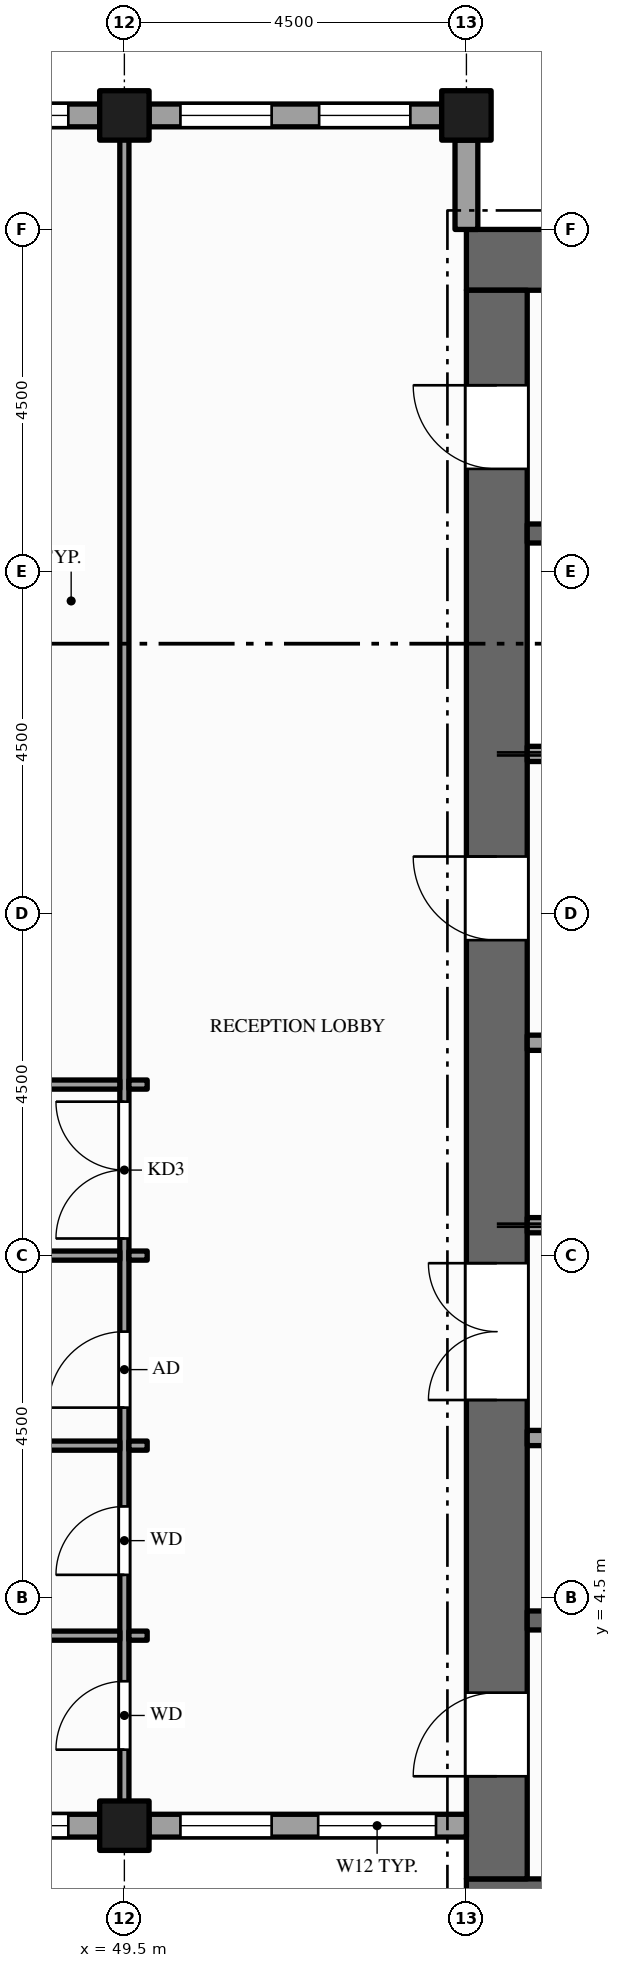
"""IFC4 building model, lengths in metres.
Left out: names, types, materials, properties, quantities, classifications, styles, units other than length and angle.
Written with IfcOpenShell. Run it as: python <this file> out.ifc"""

import sys

from ifc_helpers import new_model, si_unit, direction, frame, frame_2d, origin, origin_2d, place, context, subcontext, project, spatial, rectangle, hollow_rectangle, extrude, element, fill, save


model = new_model("IFC4")
c1 = context("Model", 3, precision=1e-05, world=origin(), true_north=direction((0.0, 1.0)))
c2 = subcontext(c1, "Body", "Model", "MODEL_VIEW")
j1 = project(units=[si_unit("LENGTHUNIT", "METRE"), si_unit("PLANEANGLEUNIT", "RADIAN")], contexts=[c1])
p1 = place(None, origin())
s1 = spatial("IfcSite", under=j1, at=p1, CompositionType="ELEMENT")
p2 = place(p1, origin())
s2 = spatial("IfcBuilding", under=s1, at=p2, CompositionType="ELEMENT")
p3 = place(p2, frame((0.0, 0.0, 249.0)))
s3 = spatial("IfcBuildingStorey", under=s2, at=p3, CompositionType="ELEMENT", Elevation=249.0)
for number, where, z_axis, x_axis in (
    (1, (67.5, 0.4, -0.15), (0.0, 0.0, 1.0), (-1.0, 0.0, 0.0)),
    (2, (54.0, 22.1, -0.15), (0.0, 0.0, 1.0), (1.0, 0.0, 0.0)),
):
    element("IfcWall", number, at=place(p3, frame(where, z_axis=z_axis, x_axis=x_axis)), inside=s3, PredefinedType="SHEAR", context=c2, shape_type="SweptSolid", body=[
        extrude(rectangle(XDim=13.5, YDim=0.8, at=frame_2d((6.75, 0.0))), origin(), (0.0, 0.0, 1.0), 4.0),
    ])
p4 = place(p3, frame((54.4, 0.8, -0.15), z_axis=(0.0, 0.0, 1.0), x_axis=(0.0, 1.0, 0.0)))
e3 = element("IfcWall", 3, at=p4, inside=s3, PredefinedType="SHEAR", context=c2, shape_type="SweptSolid", body=[
    extrude(rectangle(XDim=20.9, YDim=0.8, at=frame_2d((10.45, 0.0))), origin(), (0.0, 0.0, 1.0), 4.0),
])
p5 = place(p4, frame((6.3, 0.0, 0.15)))
e4 = element("IfcOpeningElement", 4, at=p5, cuts=e3, PredefinedType="OPENING", context=c2, shape_type="SweptSolid", body=[
    extrude(rectangle(XDim=1.8, YDim=2.1, at=frame_2d((0.9, 1.05))), frame((0.0, 0.41, 0.0), z_axis=(0.0, -1.0, 0.0), x_axis=(1.0, 0.0, 0.0)), (0.0, 0.0, 1.0), 0.82),
])
p6 = place(p4, frame((12.35, 0.0, 0.15)))
e5 = element("IfcOpeningElement", 5, at=p6, cuts=e3, PredefinedType="OPENING", context=c2, shape_type="SweptSolid", body=[
    extrude(rectangle(XDim=1.1, YDim=2.1, at=frame_2d((0.55, 1.05))), frame((0.0, 0.41, 0.0), z_axis=(0.0, -1.0, 0.0), x_axis=(1.0, 0.0, 0.0)), (0.0, 0.0, 1.0), 0.82),
])
p7 = place(p4, frame((1.35, 0.0, 0.15)))
e6 = element("IfcOpeningElement", 6, at=p7, cuts=e3, PredefinedType="OPENING", context=c2, shape_type="SweptSolid", body=[
    extrude(rectangle(XDim=1.1, YDim=2.1, at=frame_2d((0.55, 1.05))), frame((0.0, 0.41, 0.0), z_axis=(0.0, -1.0, 0.0), x_axis=(1.0, 0.0, 0.0)), (0.0, 0.0, 1.0), 0.82),
])
p8 = place(p4, frame((18.55, 0.0, 0.15)))
e7 = element("IfcOpeningElement", 7, at=p8, cuts=e3, PredefinedType="OPENING", context=c2, shape_type="SweptSolid", body=[
    extrude(rectangle(XDim=1.1, YDim=2.1, at=frame_2d((0.55, 1.05))), frame((0.0, 0.41, 0.0), z_axis=(0.0, -1.0, 0.0), x_axis=(1.0, 0.0, 0.0)), (0.0, 0.0, 1.0), 0.82),
])
for number, where, z_axis, x_axis in (
    (8, (49.5, 1.5, -0.15), (0.0, 0.0, 1.0), (1.0, 0.0, 0.0)),
    (9, (49.5, 24.0, -0.15), (0.0, 0.0, 1.0), (1.0, 0.0, 0.0)),
    (10, (54.0, 24.0, -0.15), (0.0, 0.0, 1.0), (1.0, 0.0, 0.0)),
):
    element("IfcColumn", number, at=place(p3, frame(where, z_axis=z_axis, x_axis=x_axis)), inside=s3, PredefinedType="COLUMN", context=c2, shape_type="SweptSolid", body=[
        extrude(hollow_rectangle(XDim=0.65, YDim=0.65, WallThickness=0.032, at=origin_2d()), origin(), (0.0, 0.0, 1.0), 4.0),
    ])
p9 = place(p3, frame((45.325, 1.5, 0.0), z_axis=(0.0, 0.0, 1.0), x_axis=(1.0, 0.0, 0.0)))
e11 = element("IfcWall", 11, at=p9, inside=s3, PredefinedType="STANDARD", context=c2, shape_type="SweptSolid", body=[
    extrude(rectangle(XDim=3.85, YDim=0.3, at=frame_2d((1.925, 0.0))), origin(), (0.0, 0.0, 1.0), 2.87),
])
p10 = place(p9, frame((0.413, 0.0, 0.9)))
e12 = element("IfcOpeningElement", 12, at=p10, cuts=e11, PredefinedType="OPENING", context=c2, shape_type="SweptSolid", body=[
    extrude(rectangle(XDim=1.2, YDim=1.75, at=frame_2d((0.6, 0.875))), frame((0.0, 0.16, 0.0), z_axis=(0.0, -1.0, 0.0), x_axis=(1.0, 0.0, 0.0)), (0.0, 0.0, 1.0), 0.32),
])
p11 = place(p9, frame((2.238, 0.0, 0.9)))
e13 = element("IfcOpeningElement", 13, at=p11, cuts=e11, PredefinedType="OPENING", context=c2, shape_type="SweptSolid", body=[
    extrude(rectangle(XDim=1.2, YDim=1.75, at=frame_2d((0.6, 0.875))), frame((0.0, 0.16, 0.0), z_axis=(0.0, -1.0, 0.0), x_axis=(1.0, 0.0, 0.0)), (0.0, 0.0, 1.0), 0.32),
])
p12 = place(p3, frame((49.825, 1.5, 0.0), z_axis=(0.0, 0.0, 1.0), x_axis=(1.0, 0.0, 0.0)))
e14 = element("IfcWall", 14, at=p12, inside=s3, PredefinedType="STANDARD", context=c2, shape_type="SweptSolid", body=[
    extrude(rectangle(XDim=4.175, YDim=0.3, at=frame_2d((2.087, 0.0))), origin(), (0.0, 0.0, 1.0), 2.87),
])
p13 = place(p12, frame((0.413, 0.0, 0.9)))
e15 = element("IfcOpeningElement", 15, at=p13, cuts=e14, PredefinedType="OPENING", context=c2, shape_type="SweptSolid", body=[
    extrude(rectangle(XDim=1.2, YDim=1.75, at=frame_2d((0.6, 0.875))), frame((0.0, 0.16, 0.0), z_axis=(0.0, -1.0, 0.0), x_axis=(1.0, 0.0, 0.0)), (0.0, 0.0, 1.0), 0.32),
])
p14 = place(p12, frame((2.225, 0.0, 0.9)))
e16 = element("IfcOpeningElement", 16, at=p14, cuts=e14, PredefinedType="OPENING", context=c2, shape_type="SweptSolid", body=[
    extrude(rectangle(XDim=1.55, YDim=1.75, at=frame_2d((0.775, 0.875))), frame((0.0, 0.16, 0.0), z_axis=(0.0, -1.0, 0.0), x_axis=(1.0, 0.0, 0.0)), (0.0, 0.0, 1.0), 0.32),
])
p15 = place(p3, frame((54.0, 22.5, 0.0), z_axis=(0.0, 0.0, 1.0), x_axis=(0.0, 1.0, 0.0)))
e17 = element("IfcWall", 17, at=p15, inside=s3, PredefinedType="STANDARD", context=c2, shape_type="SweptSolid", body=[
    extrude(rectangle(XDim=1.175, YDim=0.3, at=frame_2d((0.587, 0.0))), origin(), (0.0, 0.0, 1.0), 3.162),
])
p16 = place(p3, frame((53.675, 24.0, 0.0), z_axis=(0.0, 0.0, 1.0), x_axis=(-1.0, 0.0, 0.0)))
e18 = element("IfcWall", 18, at=p16, inside=s3, PredefinedType="STANDARD", context=c2, shape_type="SweptSolid", body=[
    extrude(rectangle(XDim=3.85, YDim=0.3, at=frame_2d((1.925, 0.0))), origin(), (0.0, 0.0, 1.0), 2.87),
])
p17 = place(p16, frame((0.413, 0.0, 0.9)))
e19 = element("IfcOpeningElement", 19, at=p17, cuts=e18, PredefinedType="OPENING", context=c2, shape_type="SweptSolid", body=[
    extrude(rectangle(XDim=1.2, YDim=1.75, at=frame_2d((0.6, 0.875))), frame((0.0, 0.16, 0.0), z_axis=(0.0, -1.0, 0.0), x_axis=(1.0, 0.0, 0.0)), (0.0, 0.0, 1.0), 0.32),
])
p18 = place(p16, frame((2.238, 0.0, 0.9)))
e20 = element("IfcOpeningElement", 20, at=p18, cuts=e18, PredefinedType="OPENING", context=c2, shape_type="SweptSolid", body=[
    extrude(rectangle(XDim=1.2, YDim=1.75, at=frame_2d((0.6, 0.875))), frame((0.0, 0.16, 0.0), z_axis=(0.0, -1.0, 0.0), x_axis=(1.0, 0.0, 0.0)), (0.0, 0.0, 1.0), 0.32),
])
p19 = place(p3, frame((49.175, 24.0, 0.0), z_axis=(0.0, 0.0, 1.0), x_axis=(-1.0, 0.0, 0.0)))
e21 = element("IfcWall", 21, at=p19, inside=s3, PredefinedType="STANDARD", context=c2, shape_type="SweptSolid", body=[
    extrude(rectangle(XDim=3.85, YDim=0.3, at=frame_2d((1.925, 0.0))), origin(), (0.0, 0.0, 1.0), 2.87),
])
p20 = place(p19, frame((0.413, 0.0, 0.9)))
e22 = element("IfcOpeningElement", 22, at=p20, cuts=e21, PredefinedType="OPENING", context=c2, shape_type="SweptSolid", body=[
    extrude(rectangle(XDim=1.2, YDim=1.75, at=frame_2d((0.6, 0.875))), frame((0.0, 0.16, 0.0), z_axis=(0.0, -1.0, 0.0), x_axis=(1.0, 0.0, 0.0)), (0.0, 0.0, 1.0), 0.32),
])
p21 = place(p19, frame((2.238, 0.0, 0.9)))
e23 = element("IfcOpeningElement", 23, at=p21, cuts=e21, PredefinedType="OPENING", context=c2, shape_type="SweptSolid", body=[
    extrude(rectangle(XDim=1.2, YDim=1.75, at=frame_2d((0.6, 0.875))), frame((0.0, 0.16, 0.0), z_axis=(0.0, -1.0, 0.0), x_axis=(1.0, 0.0, 0.0)), (0.0, 0.0, 1.0), 0.32),
])
p22 = place(p3, frame((49.5, 1.65, 0.0), z_axis=(0.0, 0.0, 1.0), x_axis=(0.0, 1.0, 0.0)))
e24 = element("IfcWall", 24, at=p22, inside=s3, PredefinedType="PARTITIONING", context=c2, shape_type="SweptSolid", body=[
    extrude(rectangle(XDim=22.2, YDim=0.12, at=frame_2d((11.1, 0.0))), origin(), (0.0, 0.0, 1.0), 2.87),
])
p23 = place(p22, frame((7.575, 0.0, 0.0)))
e25 = element("IfcOpeningElement", 25, at=p23, cuts=e24, PredefinedType="OPENING", context=c2, shape_type="SweptSolid", body=[
    extrude(rectangle(XDim=1.8, YDim=2.1, at=frame_2d((0.9, 1.05))), frame((0.0, 0.07, 0.0), z_axis=(0.0, -1.0, 0.0), x_axis=(1.0, 0.0, 0.0)), (0.0, 0.0, 1.0), 0.14),
])
p24 = place(p22, frame((0.85, 0.0, 0.0)))
e26 = element("IfcOpeningElement", 26, at=p24, cuts=e24, PredefinedType="OPENING", context=c2, shape_type="SweptSolid", body=[
    extrude(rectangle(XDim=0.9, YDim=2.1, at=frame_2d((0.45, 1.05))), frame((0.0, 0.07, 0.0), z_axis=(0.0, -1.0, 0.0), x_axis=(1.0, 0.0, 0.0)), (0.0, 0.0, 1.0), 0.14),
])
p25 = place(p22, frame((3.15, 0.0, 0.0)))
e27 = element("IfcOpeningElement", 27, at=p25, cuts=e24, PredefinedType="OPENING", context=c2, shape_type="SweptSolid", body=[
    extrude(rectangle(XDim=0.9, YDim=2.1, at=frame_2d((0.45, 1.05))), frame((0.0, 0.07, 0.0), z_axis=(0.0, -1.0, 0.0), x_axis=(1.0, 0.0, 0.0)), (0.0, 0.0, 1.0), 0.14),
])
p26 = place(p22, frame((5.35, 0.0, 0.0)))
e28 = element("IfcOpeningElement", 28, at=p26, cuts=e24, PredefinedType="OPENING", context=c2, shape_type="SweptSolid", body=[
    extrude(rectangle(XDim=1.0, YDim=2.1, at=frame_2d((0.5, 1.05))), frame((0.0, 0.07, 0.0), z_axis=(0.0, -1.0, 0.0), x_axis=(1.0, 0.0, 0.0)), (0.0, 0.0, 1.0), 0.14),
])
p27 = place(p3, frame((45.06, 4.0, 0.0), z_axis=(0.0, 0.0, 1.0), x_axis=(1.0, 0.0, 0.0)))
e29 = element("IfcWall", 29, at=p27, inside=s3, PredefinedType="PARTITIONING", context=c2, shape_type="SweptSolid", body=[
    extrude(rectangle(XDim=4.38, YDim=0.12, at=frame_2d((2.19, 0.0))), origin(), (0.0, 0.0, 1.0), 2.87),
])
p28 = place(p3, frame((49.56, 4.0, 0.0), z_axis=(0.0, 0.0, 1.0), x_axis=(1.0, 0.0, 0.0)))
e30 = element("IfcWall", 30, at=p28, inside=s3, PredefinedType="PARTITIONING", context=c2, shape_type="SweptSolid", body=[
    extrude(rectangle(XDim=0.24, YDim=0.12, at=frame_2d((0.12, 0.0))), origin(), (0.0, 0.0, 1.0), 2.87),
])
p29 = place(p3, frame((54.8, 4.2, 0.0), z_axis=(0.0, 0.0, 1.0), x_axis=(1.0, 0.0, 0.0)))
e31 = element("IfcWall", 31, at=p29, inside=s3, PredefinedType="SHEAR", context=c2, shape_type="SweptSolid", body=[
    extrude(rectangle(XDim=6.475, YDim=0.25, at=frame_2d((3.237, 0.0))), origin(), (0.0, 0.0, 1.0), 3.85),
])
p30 = place(p3, frame((45.06, 6.5, 0.0), z_axis=(0.0, 0.0, 1.0), x_axis=(1.0, 0.0, 0.0)))
e32 = element("IfcWall", 32, at=p30, inside=s3, PredefinedType="PARTITIONING", context=c2, shape_type="SweptSolid", body=[
    extrude(rectangle(XDim=4.38, YDim=0.12, at=frame_2d((2.19, 0.0))), origin(), (0.0, 0.0, 1.0), 2.87),
])
p31 = place(p3, frame((49.56, 6.5, 0.0), z_axis=(0.0, 0.0, 1.0), x_axis=(1.0, 0.0, 0.0)))
e33 = element("IfcWall", 33, at=p31, inside=s3, PredefinedType="PARTITIONING", context=c2, shape_type="SweptSolid", body=[
    extrude(rectangle(XDim=0.24, YDim=0.12, at=frame_2d((0.12, 0.0))), origin(), (0.0, 0.0, 1.0), 2.87),
])
p32 = place(p3, frame((54.8, 6.6, 0.0), z_axis=(0.0, 0.0, 1.0), x_axis=(1.0, 0.0, 0.0)))
e34 = element("IfcWall", 34, at=p32, inside=s3, PredefinedType="PARTITIONING", context=c2, shape_type="SweptSolid", body=[
    extrude(rectangle(XDim=4.7, YDim=0.2, at=frame_2d((2.35, 0.0))), origin(), (0.0, 0.0, 1.0), 3.85),
])
p33 = place(p32, frame((1.9, 0.0, 0.0)))
e35 = element("IfcOpeningElement", 35, at=p33, cuts=e34, PredefinedType="OPENING", context=c2, shape_type="SweptSolid", body=[
    extrude(rectangle(XDim=0.9, YDim=2.1, at=frame_2d((0.45, 1.05))), frame((0.0, 0.11, 0.0), z_axis=(0.0, -1.0, 0.0), x_axis=(1.0, 0.0, 0.0)), (0.0, 0.0, 1.0), 0.22),
])
p34 = place(p3, frame((45.06, 9.0, 0.0), z_axis=(0.0, 0.0, 1.0), x_axis=(1.0, 0.0, 0.0)))
e36 = element("IfcWall", 36, at=p34, inside=s3, PredefinedType="PARTITIONING", context=c2, shape_type="SweptSolid", body=[
    extrude(rectangle(XDim=4.38, YDim=0.12, at=frame_2d((2.19, 0.0))), origin(), (0.0, 0.0, 1.0), 2.87),
])
p35 = place(p3, frame((49.56, 9.0, 0.0), z_axis=(0.0, 0.0, 1.0), x_axis=(1.0, 0.0, 0.0)))
e37 = element("IfcWall", 37, at=p35, inside=s3, PredefinedType="PARTITIONING", context=c2, shape_type="SweptSolid", body=[
    extrude(rectangle(XDim=0.24, YDim=0.12, at=frame_2d((0.12, 0.0))), origin(), (0.0, 0.0, 1.0), 2.87),
])
p36 = place(p3, frame((54.8, 9.4, 0.0), z_axis=(0.0, 0.0, 1.0), x_axis=(1.0, 0.0, 0.0)))
e38 = element("IfcWall", 38, at=p36, inside=s3, PredefinedType="SOLIDWALL", context=c2, shape_type="SweptSolid", body=[
    extrude(rectangle(XDim=2.5, YDim=0.2, at=frame_2d((1.25, 0.0))), origin(), (0.0, 0.0, 1.0), 3.85),
])
p37 = place(p36, frame((0.7, 0.0, 0.012)))
e39 = element("IfcOpeningElement", 39, at=p37, cuts=e38, PredefinedType="OPENING", context=c2, shape_type="SweptSolid", body=[
    extrude(rectangle(XDim=1.1, YDim=2.1, at=frame_2d((0.55, 1.05))), frame((0.0, 0.11, 0.0), z_axis=(0.0, -1.0, 0.0), x_axis=(1.0, 0.0, 0.0)), (0.0, 0.0, 1.0), 0.22),
])
p38 = place(p3, frame((45.06, 11.25, 0.0), z_axis=(0.0, 0.0, 1.0), x_axis=(1.0, 0.0, 0.0)))
e40 = element("IfcWall", 40, at=p38, inside=s3, PredefinedType="PARTITIONING", context=c2, shape_type="SweptSolid", body=[
    extrude(rectangle(XDim=4.38, YDim=0.12, at=frame_2d((2.19, 0.0))), origin(), (0.0, 0.0, 1.0), 2.87),
])
p39 = place(p38, frame((1.74, 0.0, 0.0)))
e41 = element("IfcOpeningElement", 41, at=p39, cuts=e40, PredefinedType="OPENING", context=c2, shape_type="SweptSolid", body=[
    extrude(rectangle(XDim=0.9, YDim=2.1, at=frame_2d((0.45, 1.05))), frame((0.0, 0.07, 0.0), z_axis=(0.0, -1.0, 0.0), x_axis=(1.0, 0.0, 0.0)), (0.0, 0.0, 1.0), 0.14),
])
p40 = place(p3, frame((49.56, 11.25, 0.0), z_axis=(0.0, 0.0, 1.0), x_axis=(1.0, 0.0, 0.0)))
e42 = element("IfcWall", 42, at=p40, inside=s3, PredefinedType="PARTITIONING", context=c2, shape_type="SweptSolid", body=[
    extrude(rectangle(XDim=0.24, YDim=0.12, at=frame_2d((0.12, 0.0))), origin(), (0.0, 0.0, 1.0), 2.87),
])
p41 = place(p3, frame((54.8, 11.8, 0.0), z_axis=(0.0, 0.0, 1.0), x_axis=(1.0, 0.0, 0.0)))
e43 = element("IfcWall", 43, at=p41, inside=s3, PredefinedType="SOLIDWALL", context=c2, shape_type="SweptSolid", body=[
    extrude(rectangle(XDim=2.5, YDim=0.2, at=frame_2d((1.25, 0.0))), origin(), (0.0, 0.0, 1.0), 3.85),
])
p42 = place(p3, frame((54.8, 15.6, 0.0), z_axis=(0.0, 0.0, 1.0), x_axis=(1.0, 0.0, 0.0)))
e44 = element("IfcWall", 44, at=p42, inside=s3, PredefinedType="SOLIDWALL", context=c2, shape_type="SweptSolid", body=[
    extrude(rectangle(XDim=2.5, YDim=0.2, at=frame_2d((1.25, 0.0))), origin(), (0.0, 0.0, 1.0), 3.85),
])
p43 = place(p42, frame((0.7, 0.0, 0.012)))
e45 = element("IfcOpeningElement", 45, at=p43, cuts=e44, PredefinedType="OPENING", context=c2, shape_type="SweptSolid", body=[
    extrude(rectangle(XDim=1.1, YDim=2.1, at=frame_2d((0.55, 1.05))), frame((0.0, 0.11, 0.0), z_axis=(0.0, -1.0, 0.0), x_axis=(1.0, 0.0, 0.0)), (0.0, 0.0, 1.0), 0.22),
])
p44 = place(p3, frame((54.8, 18.5, 0.0), z_axis=(0.0, 0.0, 1.0), x_axis=(1.0, 0.0, 0.0)))
e46 = element("IfcWall", 46, at=p44, inside=s3, PredefinedType="SHEAR", context=c2, shape_type="SweptSolid", body=[
    extrude(rectangle(XDim=6.475, YDim=0.25, at=frame_2d((3.237, 0.0))), origin(), (0.0, 0.0, 1.0), 3.85),
])
p45 = place(p11, origin())
e47 = element("IfcWindow", 47, at=p45, inside=s3, PartitioningType="SINGLE_PANEL", PredefinedType="WINDOW", context=c2, shape_type="SweptSolid", body=[
    extrude(rectangle(XDim=1.2, YDim=1.75, at=frame_2d((0.6, 0.875))), frame((0.0, 0.03, 0.0), z_axis=(0.0, -1.0, 0.0), x_axis=(1.0, 0.0, 0.0)), (0.0, 0.0, 1.0), 0.06),
])
fill(e13, e47)
p46 = place(p13, origin())
e48 = element("IfcWindow", 48, at=p46, inside=s3, PartitioningType="SINGLE_PANEL", PredefinedType="WINDOW", context=c2, shape_type="SweptSolid", body=[
    extrude(rectangle(XDim=1.2, YDim=1.75, at=frame_2d((0.6, 0.875))), frame((0.0, 0.03, 0.0), z_axis=(0.0, -1.0, 0.0), x_axis=(1.0, 0.0, 0.0)), (0.0, 0.0, 1.0), 0.06),
])
fill(e15, e48)
p47 = place(p14, origin())
e49 = element("IfcWindow", 49, at=p47, inside=s3, PartitioningType="SINGLE_PANEL", PredefinedType="WINDOW", context=c2, shape_type="SweptSolid", body=[
    extrude(rectangle(XDim=1.55, YDim=1.75, at=frame_2d((0.775, 0.875))), frame((0.0, 0.03, 0.0), z_axis=(0.0, -1.0, 0.0), x_axis=(1.0, 0.0, 0.0)), (0.0, 0.0, 1.0), 0.06),
])
fill(e16, e49)
p48 = place(p17, origin())
e50 = element("IfcWindow", 50, at=p48, inside=s3, PartitioningType="SINGLE_PANEL", PredefinedType="WINDOW", context=c2, shape_type="SweptSolid", body=[
    extrude(rectangle(XDim=1.2, YDim=1.75, at=frame_2d((0.6, 0.875))), frame((0.0, 0.03, 0.0), z_axis=(0.0, -1.0, 0.0), x_axis=(1.0, 0.0, 0.0)), (0.0, 0.0, 1.0), 0.06),
])
fill(e19, e50)
p49 = place(p18, origin())
e51 = element("IfcWindow", 51, at=p49, inside=s3, PartitioningType="SINGLE_PANEL", PredefinedType="WINDOW", context=c2, shape_type="SweptSolid", body=[
    extrude(rectangle(XDim=1.2, YDim=1.75, at=frame_2d((0.6, 0.875))), frame((0.0, 0.03, 0.0), z_axis=(0.0, -1.0, 0.0), x_axis=(1.0, 0.0, 0.0)), (0.0, 0.0, 1.0), 0.06),
])
fill(e20, e51)
p50 = place(p20, origin())
e52 = element("IfcWindow", 52, at=p50, inside=s3, PartitioningType="SINGLE_PANEL", PredefinedType="WINDOW", context=c2, shape_type="SweptSolid", body=[
    extrude(rectangle(XDim=1.2, YDim=1.75, at=frame_2d((0.6, 0.875))), frame((0.0, 0.03, 0.0), z_axis=(0.0, -1.0, 0.0), x_axis=(1.0, 0.0, 0.0)), (0.0, 0.0, 1.0), 0.06),
])
fill(e22, e52)
p51 = place(p5, origin())
e53 = element("IfcDoor", 53, at=p51, inside=s3, OperationType="DOUBLE_DOOR_SINGLE_SWING", PredefinedType="DOOR", context=c2, shape_type="SweptSolid", body=[
    extrude(rectangle(XDim=1.8, YDim=2.1, at=frame_2d((0.9, 1.05))), frame((0.0, 0.025, 0.0), z_axis=(0.0, -1.0, 0.0), x_axis=(1.0, 0.0, 0.0)), (0.0, 0.0, 1.0), 0.05),
])
fill(e4, e53)
p52 = place(p6, origin())
e54 = element("IfcDoor", 54, at=p52, inside=s3, OperationType="SINGLE_SWING_RIGHT", PredefinedType="DOOR", context=c2, shape_type="SweptSolid", body=[
    extrude(rectangle(XDim=1.1, YDim=2.1, at=frame_2d((0.55, 1.05))), frame((0.0, 0.025, 0.0), z_axis=(0.0, -1.0, 0.0), x_axis=(1.0, 0.0, 0.0)), (0.0, 0.0, 1.0), 0.05),
])
fill(e5, e54)
p53 = place(p7, origin())
e55 = element("IfcDoor", 55, at=p53, inside=s3, OperationType="SINGLE_SWING_LEFT", PredefinedType="DOOR", context=c2, shape_type="SweptSolid", body=[
    extrude(rectangle(XDim=1.1, YDim=2.1, at=frame_2d((0.55, 1.05))), frame((0.0, 0.025, 0.0), z_axis=(0.0, -1.0, 0.0), x_axis=(1.0, 0.0, 0.0)), (0.0, 0.0, 1.0), 0.05),
])
fill(e6, e55)
p54 = place(p8, origin())
e56 = element("IfcDoor", 56, at=p54, inside=s3, OperationType="SINGLE_SWING_RIGHT", PredefinedType="DOOR", context=c2, shape_type="SweptSolid", body=[
    extrude(rectangle(XDim=1.1, YDim=2.1, at=frame_2d((0.55, 1.05))), frame((0.0, 0.025, 0.0), z_axis=(0.0, -1.0, 0.0), x_axis=(1.0, 0.0, 0.0)), (0.0, 0.0, 1.0), 0.05),
])
fill(e7, e56)
p55 = place(p23, origin())
e57 = element("IfcDoor", 57, at=p55, inside=s3, OperationType="DOUBLE_DOOR_SINGLE_SWING", PredefinedType="DOOR", context=c2, shape_type="SweptSolid", body=[
    extrude(rectangle(XDim=1.8, YDim=2.1, at=frame_2d((0.9, 1.05))), frame((0.0, 0.025, 0.0), z_axis=(0.0, -1.0, 0.0), x_axis=(1.0, 0.0, 0.0)), (0.0, 0.0, 1.0), 0.05),
])
fill(e25, e57)
p56 = place(p24, origin())
e58 = element("IfcDoor", 58, at=p56, inside=s3, OperationType="SINGLE_SWING_LEFT", PredefinedType="DOOR", context=c2, shape_type="SweptSolid", body=[
    extrude(rectangle(XDim=0.9, YDim=2.1, at=frame_2d((0.45, 1.05))), frame((0.0, 0.025, 0.0), z_axis=(0.0, -1.0, 0.0), x_axis=(1.0, 0.0, 0.0)), (0.0, 0.0, 1.0), 0.05),
])
fill(e26, e58)
p57 = place(p25, origin())
e59 = element("IfcDoor", 59, at=p57, inside=s3, OperationType="SINGLE_SWING_LEFT", PredefinedType="DOOR", context=c2, shape_type="SweptSolid", body=[
    extrude(rectangle(XDim=0.9, YDim=2.1, at=frame_2d((0.45, 1.05))), frame((0.0, 0.025, 0.0), z_axis=(0.0, -1.0, 0.0), x_axis=(1.0, 0.0, 0.0)), (0.0, 0.0, 1.0), 0.05),
])
fill(e27, e59)
p58 = place(p26, origin())
e60 = element("IfcDoor", 60, at=p58, inside=s3, OperationType="SINGLE_SWING_LEFT", PredefinedType="DOOR", context=c2, shape_type="SweptSolid", body=[
    extrude(rectangle(XDim=1.0, YDim=2.1, at=frame_2d((0.5, 1.05))), frame((0.0, 0.025, 0.0), z_axis=(0.0, -1.0, 0.0), x_axis=(1.0, 0.0, 0.0)), (0.0, 0.0, 1.0), 0.05),
])
fill(e28, e60)
save(model, sys.argv[1])
